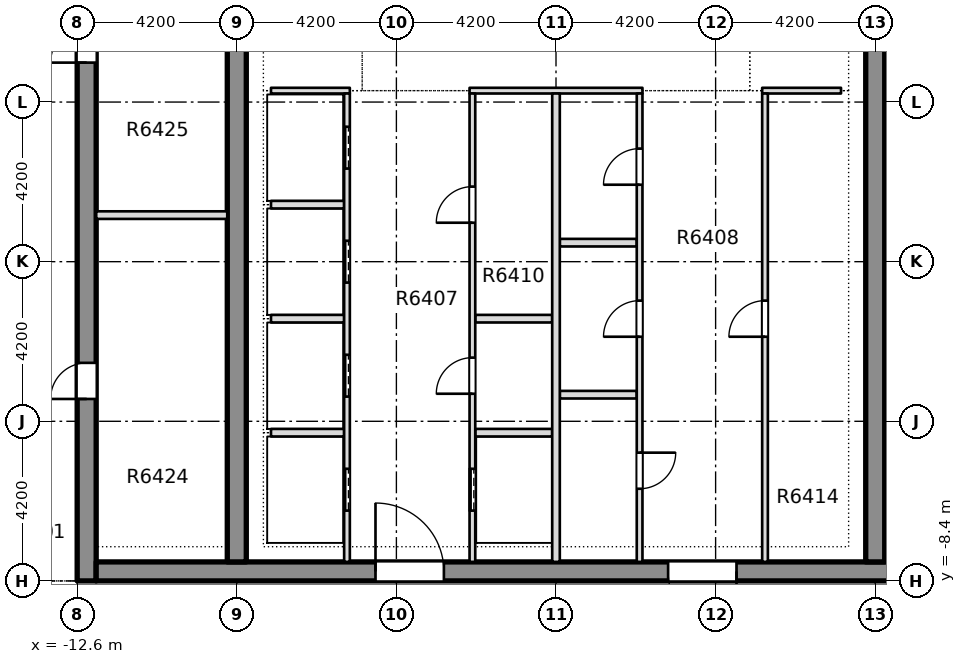
"""IFC4 building model, lengths in metres.
Left out: names, types, materials, properties, quantities, classifications, styles, units other than length and angle.
Written with IfcOpenShell. Run it as: python <this file> out.ifc"""

import sys

from ifc_helpers import new_model, si_unit, direction, frame, frame_2d, origin, place, context, subcontext, project, spatial, rectangle, extrude, element, fill, save


model = new_model("IFC4")
c1 = context("Model", 3, precision=1e-05, world=origin(), true_north=direction((0.0, 1.0)))
c2 = subcontext(c1, "Body", "Model", "MODEL_VIEW")
j1 = project(units=[si_unit("LENGTHUNIT", "METRE"), si_unit("PLANEANGLEUNIT", "RADIAN")], contexts=[c1])
p1 = place(None, origin())
s1 = spatial("IfcSite", under=j1, at=p1, CompositionType="ELEMENT")
p2 = place(p1, origin())
s2 = spatial("IfcBuilding", under=s1, at=p2, CompositionType="ELEMENT")
p3 = place(p2, frame((0.0, 0.0, 244.15)))
s3 = spatial("IfcBuildingStorey", under=s2, at=p3, CompositionType="ELEMENT", Elevation=244.15)
p4 = place(p3, frame((-12.35, -8.4, -0.4), z_axis=(0.0, 0.0, 1.0), x_axis=(0.0, 1.0, 0.0)))
e1 = element("IfcWall", 1, at=p4, inside=s3, PredefinedType="SHEAR", context=c2, shape_type="SweptSolid", body=[
    extrude(rectangle(XDim=30.15, YDim=0.5, at=frame_2d((15.075, 0.0))), origin(), (0.0, 0.0, 1.0), 3.45),
])
p5 = place(p4, frame((4.788, 0.0, 0.4)))
e2 = element("IfcOpeningElement", 2, at=p5, cuts=e1, PredefinedType="OPENING", context=c2, shape_type="SweptSolid", body=[
    extrude(rectangle(XDim=0.95, YDim=2.1, at=frame_2d((0.475, 1.05))), frame((0.0, 0.26, 0.0), z_axis=(0.0, -1.0, 0.0), x_axis=(1.0, 0.0, 0.0)), (0.0, 0.0, 1.0), 0.52),
])
p6 = place(p4, frame((13.638, 0.0, 0.4)))
e3 = element("IfcOpeningElement", 3, at=p6, cuts=e1, PredefinedType="OPENING", context=c2, shape_type="SweptSolid", body=[
    extrude(rectangle(XDim=0.95, YDim=2.1, at=frame_2d((0.475, 1.05))), frame((0.0, 0.26, 0.0), z_axis=(0.0, -1.0, 0.0), x_axis=(1.0, 0.0, 0.0)), (0.0, 0.0, 1.0), 0.52),
])
p7 = place(p4, frame((21.771, 0.0, 0.4)))
e4 = element("IfcOpeningElement", 4, at=p7, cuts=e1, PredefinedType="OPENING", context=c2, shape_type="SweptSolid", body=[
    extrude(rectangle(XDim=0.95, YDim=2.1, at=frame_2d((0.475, 1.05))), frame((0.0, 0.26, 0.0), z_axis=(0.0, -1.0, 0.0), x_axis=(1.0, 0.0, 0.0)), (0.0, 0.0, 1.0), 0.52),
])
p8 = place(p4, frame((24.576, 0.0, 0.4)))
e5 = element("IfcOpeningElement", 5, at=p8, cuts=e1, PredefinedType="OPENING", context=c2, shape_type="SweptSolid", body=[
    extrude(rectangle(XDim=0.95, YDim=2.1, at=frame_2d((0.475, 1.05))), frame((0.0, 0.26, 0.0), z_axis=(0.0, -1.0, 0.0), x_axis=(1.0, 0.0, 0.0)), (0.0, 0.0, 1.0), 0.52),
])
p9 = place(p4, frame((27.555, 0.0, 0.4)))
e6 = element("IfcOpeningElement", 6, at=p9, cuts=e1, PredefinedType="OPENING", context=c2, shape_type="SweptSolid", body=[
    extrude(rectangle(XDim=0.95, YDim=2.1, at=frame_2d((0.475, 1.05))), frame((0.0, 0.26, 0.0), z_axis=(0.0, -1.0, 0.0), x_axis=(1.0, 0.0, 0.0)), (0.0, 0.0, 1.0), 0.52),
])
p10 = place(p4, frame((19.3, 0.0, 0.4)))
e7 = element("IfcOpeningElement", 7, at=p10, cuts=e1, PredefinedType="OPENING", context=c2, shape_type="SweptSolid", body=[
    extrude(rectangle(XDim=1.2, YDim=2.1, at=frame_2d((0.6, 1.05))), frame((0.0, 0.26, 0.0), z_axis=(0.0, -1.0, 0.0), x_axis=(1.0, 0.0, 0.0)), (0.0, 0.0, 1.0), 0.52),
])
p11 = place(p3, frame((-12.1, -8.15, -0.4), z_axis=(0.0, 0.0, 1.0), x_axis=(1.0, 0.0, 0.0)))
e8 = element("IfcWall", 8, at=p11, inside=s3, PredefinedType="SHEAR", context=c2, shape_type="SweptSolid", body=[
    extrude(rectangle(XDim=24.2, YDim=0.5, at=frame_2d((12.1, 0.0))), origin(), (0.0, 0.0, 1.0), 3.45),
])
p12 = place(p11, frame((7.35, 0.0, 0.4)))
e9 = element("IfcOpeningElement", 9, at=p12, cuts=e8, PredefinedType="OPENING", context=c2, shape_type="SweptSolid", body=[
    extrude(rectangle(XDim=1.8, YDim=2.1, at=frame_2d((0.9, 1.05))), frame((0.0, 0.26, 0.0), z_axis=(0.0, -1.0, 0.0), x_axis=(1.0, 0.0, 0.0)), (0.0, 0.0, 1.0), 0.52),
])
p13 = place(p11, frame((15.05, 0.0, 0.4)))
e10 = element("IfcOpeningElement", 10, at=p13, cuts=e8, PredefinedType="OPENING", context=c2, shape_type="SweptSolid", body=[
    extrude(rectangle(XDim=1.8, YDim=2.1, at=frame_2d((0.9, 1.05))), frame((0.0, 0.26, 0.0), z_axis=(0.0, -1.0, 0.0), x_axis=(1.0, 0.0, 0.0)), (0.0, 0.0, 1.0), 0.52),
])
p14 = place(p3, frame((-8.4, -7.9, -0.4), z_axis=(0.0, 0.0, 1.0), x_axis=(0.0, 1.0, 0.0)))
e11 = element("IfcWall", 11, at=p14, inside=s3, PredefinedType="SHEAR", context=c2, shape_type="SweptSolid", body=[
    extrude(rectangle(XDim=29.15, YDim=0.5, at=frame_2d((14.575, 0.0))), origin(), (0.0, 0.0, 1.0), 3.45),
])
p15 = place(p14, frame((18.8, 0.0, 0.4)))
e12 = element("IfcOpeningElement", 12, at=p15, cuts=e11, PredefinedType="OPENING", context=c2, shape_type="SweptSolid", body=[
    extrude(rectangle(XDim=1.2, YDim=2.1, at=frame_2d((0.6, 1.05))), frame((0.0, 0.26, 0.0), z_axis=(0.0, -1.0, 0.0), x_axis=(1.0, 0.0, 0.0)), (0.0, 0.0, 1.0), 0.52),
])
p16 = place(p3, frame((8.4, -7.9, -0.4), z_axis=(0.0, 0.0, 1.0), x_axis=(0.0, 1.0, 0.0)))
e13 = element("IfcWall", 13, at=p16, inside=s3, PredefinedType="SHEAR", context=c2, shape_type="SweptSolid", body=[
    extrude(rectangle(XDim=29.15, YDim=0.5, at=frame_2d((14.575, 0.0))), origin(), (0.0, 0.0, 1.0), 3.45),
])
p17 = place(p16, frame((18.8, 0.0, 0.4)))
e14 = element("IfcOpeningElement", 14, at=p17, cuts=e13, PredefinedType="OPENING", context=c2, shape_type="SweptSolid", body=[
    extrude(rectangle(XDim=1.2, YDim=2.1, at=frame_2d((0.6, 1.05))), frame((0.0, 0.26, 0.0), z_axis=(0.0, -1.0, 0.0), x_axis=(1.0, 0.0, 0.0)), (0.0, 0.0, 1.0), 0.52),
])
p18 = place(p3, frame((-7.5, -4.5, 0.0), z_axis=(0.0, 0.0, 1.0), x_axis=(1.0, 0.0, 0.0)))
e15 = element("IfcWall", 15, at=p18, inside=s3, PredefinedType="PARTITIONING", context=c2, shape_type="SweptSolid", body=[
    extrude(rectangle(XDim=1.925, YDim=0.2, at=frame_2d((0.962, 0.0))), origin(), (0.0, 0.0, 1.0), 3.05),
])
for number, where, z_axis, x_axis in (
    (16, (-2.125, -4.5, 0.0), (0.0, 0.0, 1.0), (1.0, 0.0, 0.0)),
    (17, (0.1, -3.5, 0.0), (0.0, 0.0, 1.0), (1.0, 0.0, 0.0)),
):
    element("IfcWall", number, at=place(p3, frame(where, z_axis=z_axis, x_axis=x_axis)), inside=s3, PredefinedType="PARTITIONING", context=c2, shape_type="SweptSolid", body=[
        extrude(rectangle(XDim=2.025, YDim=0.2, at=frame_2d((1.012, 0.0))), origin(), (0.0, 0.0, 1.0), 3.05),
    ])
p19 = place(p3, frame((-7.5, -1.5, 0.0), z_axis=(0.0, 0.0, 1.0), x_axis=(1.0, 0.0, 0.0)))
e18 = element("IfcWall", 18, at=p19, inside=s3, PredefinedType="PARTITIONING", context=c2, shape_type="SweptSolid", body=[
    extrude(rectangle(XDim=1.925, YDim=0.2, at=frame_2d((0.962, 0.0))), origin(), (0.0, 0.0, 1.0), 3.05),
])
for number, where, z_axis, x_axis in (
    (19, (-2.125, -1.5, 0.0), (0.0, 0.0, 1.0), (1.0, 0.0, 0.0)),
    (20, (0.1, 0.5, 0.0), (0.0, 0.0, 1.0), (1.0, 0.0, 0.0)),
):
    element("IfcWall", number, at=place(p3, frame(where, z_axis=z_axis, x_axis=x_axis)), inside=s3, PredefinedType="PARTITIONING", context=c2, shape_type="SweptSolid", body=[
        extrude(rectangle(XDim=2.025, YDim=0.2, at=frame_2d((1.012, 0.0))), origin(), (0.0, 0.0, 1.0), 3.05),
    ])
p20 = place(p3, frame((-7.5, 1.5, 0.0), z_axis=(0.0, 0.0, 1.0), x_axis=(1.0, 0.0, 0.0)))
e21 = element("IfcWall", 21, at=p20, inside=s3, PredefinedType="PARTITIONING", context=c2, shape_type="SweptSolid", body=[
    extrude(rectangle(XDim=1.925, YDim=0.2, at=frame_2d((0.962, 0.0))), origin(), (0.0, 0.0, 1.0), 3.05),
])
p21 = place(p3, frame((-7.5, 4.5, 0.0), z_axis=(0.0, 0.0, 1.0), x_axis=(1.0, 0.0, 0.0)))
e22 = element("IfcWall", 22, at=p21, inside=s3, PredefinedType="PARTITIONING", context=c2, shape_type="SweptSolid", body=[
    extrude(rectangle(XDim=2.075, YDim=0.15, at=frame_2d((1.038, 0.0))), origin(), (0.0, 0.0, 1.0), 3.05),
])
p22 = place(p3, frame((-2.275, 4.5, 0.0), z_axis=(0.0, 0.0, 1.0), x_axis=(1.0, 0.0, 0.0)))
e23 = element("IfcWall", 23, at=p22, inside=s3, PredefinedType="PARTITIONING", context=c2, shape_type="SweptSolid", body=[
    extrude(rectangle(XDim=4.55, YDim=0.15, at=frame_2d((2.275, 0.0))), origin(), (0.0, 0.0, 1.0), 3.05),
])
p23 = place(p3, frame((5.425, 4.5, 0.0), z_axis=(0.0, 0.0, 1.0), x_axis=(1.0, 0.0, 0.0)))
e24 = element("IfcWall", 24, at=p23, inside=s3, PredefinedType="PARTITIONING", context=c2, shape_type="SweptSolid", body=[
    extrude(rectangle(XDim=2.075, YDim=0.15, at=frame_2d((1.038, 0.0))), origin(), (0.0, 0.0, 1.0), 3.05),
])
p24 = place(p3, frame((-5.5, -7.899, 0.0), z_axis=(0.0, 0.0, 1.0), x_axis=(0.0, 1.0, 0.0)))
e25 = element("IfcWall", 25, at=p24, inside=s3, PredefinedType="PARTITIONING", context=c2, shape_type="SweptSolid", body=[
    extrude(rectangle(XDim=12.324, YDim=0.15, at=frame_2d((6.162, 0.0))), origin(), (0.0, 0.0, 1.0), 3.05),
])
p25 = place(p24, frame((1.349, 0.0, 0.0)))
e26 = element("IfcOpeningElement", 26, at=p25, cuts=e25, PredefinedType="OPENING", context=c2, shape_type="SweptSolid", body=[
    extrude(rectangle(XDim=1.1, YDim=2.1, at=frame_2d((0.55, 1.05))), frame((0.0, 0.085, 0.0), z_axis=(0.0, -1.0, 0.0), x_axis=(1.0, 0.0, 0.0)), (0.0, 0.0, 1.0), 0.17),
])
p26 = place(p24, frame((4.349, 0.0, 0.0)))
e27 = element("IfcOpeningElement", 27, at=p26, cuts=e25, PredefinedType="OPENING", context=c2, shape_type="SweptSolid", body=[
    extrude(rectangle(XDim=1.1, YDim=2.1, at=frame_2d((0.55, 1.05))), frame((0.0, 0.085, 0.0), z_axis=(0.0, -1.0, 0.0), x_axis=(1.0, 0.0, 0.0)), (0.0, 0.0, 1.0), 0.17),
])
p27 = place(p24, frame((7.349, 0.0, 0.0)))
e28 = element("IfcOpeningElement", 28, at=p27, cuts=e25, PredefinedType="OPENING", context=c2, shape_type="SweptSolid", body=[
    extrude(rectangle(XDim=1.1, YDim=2.1, at=frame_2d((0.55, 1.05))), frame((0.0, 0.085, 0.0), z_axis=(0.0, -1.0, 0.0), x_axis=(1.0, 0.0, 0.0)), (0.0, 0.0, 1.0), 0.17),
])
p28 = place(p24, frame((10.349, 0.0, 0.0)))
e29 = element("IfcOpeningElement", 29, at=p28, cuts=e25, PredefinedType="OPENING", context=c2, shape_type="SweptSolid", body=[
    extrude(rectangle(XDim=1.1, YDim=2.1, at=frame_2d((0.55, 1.05))), frame((0.0, 0.085, 0.0), z_axis=(0.0, -1.0, 0.0), x_axis=(1.0, 0.0, 0.0)), (0.0, 0.0, 1.0), 0.17),
])
p29 = place(p3, frame((-2.2, -7.899, 0.0), z_axis=(0.0, 0.0, 1.0), x_axis=(0.0, 1.0, 0.0)))
e30 = element("IfcWall", 30, at=p29, inside=s3, PredefinedType="PARTITIONING", context=c2, shape_type="SweptSolid", body=[
    extrude(rectangle(XDim=12.324, YDim=0.15, at=frame_2d((6.162, 0.0))), origin(), (0.0, 0.0, 1.0), 3.05),
])
p30 = place(p29, frame((1.349, 0.0, 0.0)))
e31 = element("IfcOpeningElement", 31, at=p30, cuts=e30, PredefinedType="OPENING", context=c2, shape_type="SweptSolid", body=[
    extrude(rectangle(XDim=1.1, YDim=2.1, at=frame_2d((0.55, 1.05))), frame((0.0, 0.085, 0.0), z_axis=(0.0, -1.0, 0.0), x_axis=(1.0, 0.0, 0.0)), (0.0, 0.0, 1.0), 0.17),
])
p31 = place(p29, frame((4.424, 0.0, 0.0)))
e32 = element("IfcOpeningElement", 32, at=p31, cuts=e30, PredefinedType="OPENING", context=c2, shape_type="SweptSolid", body=[
    extrude(rectangle(XDim=0.95, YDim=2.1, at=frame_2d((0.475, 1.05))), frame((0.0, 0.085, 0.0), z_axis=(0.0, -1.0, 0.0), x_axis=(1.0, 0.0, 0.0)), (0.0, 0.0, 1.0), 0.17),
])
p32 = place(p29, frame((8.924, 0.0, 0.0)))
e33 = element("IfcOpeningElement", 33, at=p32, cuts=e30, PredefinedType="OPENING", context=c2, shape_type="SweptSolid", body=[
    extrude(rectangle(XDim=0.95, YDim=2.1, at=frame_2d((0.475, 1.05))), frame((0.0, 0.085, 0.0), z_axis=(0.0, -1.0, 0.0), x_axis=(1.0, 0.0, 0.0)), (0.0, 0.0, 1.0), 0.17),
])
p33 = place(p3, frame((0.0, -7.899, 0.0), z_axis=(0.0, 0.0, 1.0), x_axis=(0.0, 1.0, 0.0)))
e34 = element("IfcWall", 34, at=p33, inside=s3, PredefinedType="PARTITIONING", context=c2, shape_type="SweptSolid", body=[
    extrude(rectangle(XDim=12.324, YDim=0.2, at=frame_2d((6.162, 0.0))), origin(), (0.0, 0.0, 1.0), 3.05),
])
p34 = place(p3, frame((2.2, -7.899, 0.0), z_axis=(0.0, 0.0, 1.0), x_axis=(0.0, 1.0, 0.0)))
e35 = element("IfcWall", 35, at=p34, inside=s3, PredefinedType="PARTITIONING", context=c2, shape_type="SweptSolid", body=[
    extrude(rectangle(XDim=12.324, YDim=0.15, at=frame_2d((6.162, 0.0))), origin(), (0.0, 0.0, 1.0), 3.05),
])
p35 = place(p34, frame((1.924, 0.0, 0.0)))
e36 = element("IfcOpeningElement", 36, at=p35, cuts=e35, PredefinedType="OPENING", context=c2, shape_type="SweptSolid", body=[
    extrude(rectangle(XDim=0.95, YDim=2.1, at=frame_2d((0.475, 1.05))), frame((0.0, 0.085, 0.0), z_axis=(0.0, -1.0, 0.0), x_axis=(1.0, 0.0, 0.0)), (0.0, 0.0, 1.0), 0.17),
])
p36 = place(p34, frame((5.924, 0.0, 0.0)))
e37 = element("IfcOpeningElement", 37, at=p36, cuts=e35, PredefinedType="OPENING", context=c2, shape_type="SweptSolid", body=[
    extrude(rectangle(XDim=0.95, YDim=2.1, at=frame_2d((0.475, 1.05))), frame((0.0, 0.085, 0.0), z_axis=(0.0, -1.0, 0.0), x_axis=(1.0, 0.0, 0.0)), (0.0, 0.0, 1.0), 0.17),
])
p37 = place(p34, frame((9.924, 0.0, 0.0)))
e38 = element("IfcOpeningElement", 38, at=p37, cuts=e35, PredefinedType="OPENING", context=c2, shape_type="SweptSolid", body=[
    extrude(rectangle(XDim=0.95, YDim=2.1, at=frame_2d((0.475, 1.05))), frame((0.0, 0.085, 0.0), z_axis=(0.0, -1.0, 0.0), x_axis=(1.0, 0.0, 0.0)), (0.0, 0.0, 1.0), 0.17),
])
p38 = place(p3, frame((5.5, -7.899, 0.0), z_axis=(0.0, 0.0, 1.0), x_axis=(0.0, 1.0, 0.0)))
e39 = element("IfcWall", 39, at=p38, inside=s3, PredefinedType="PARTITIONING", context=c2, shape_type="SweptSolid", body=[
    extrude(rectangle(XDim=12.324, YDim=0.15, at=frame_2d((6.162, 0.0))), origin(), (0.0, 0.0, 1.0), 3.05),
])
p39 = place(p38, frame((5.924, 0.0, 0.0)))
e40 = element("IfcOpeningElement", 40, at=p39, cuts=e39, PredefinedType="OPENING", context=c2, shape_type="SweptSolid", body=[
    extrude(rectangle(XDim=0.95, YDim=2.1, at=frame_2d((0.475, 1.05))), frame((0.0, 0.085, 0.0), z_axis=(0.0, -1.0, 0.0), x_axis=(1.0, 0.0, 0.0)), (0.0, 0.0, 1.0), 0.17),
])
for number, where, z_axis, x_axis in (
    (41, (-12.099, 1.225, 0.0), (0.0, 0.0, 1.0), (1.0, 0.0, 0.0)),
    (42, (8.651, -1.519, 0.0), (0.0, 0.0, 1.0), (1.0, 0.0, 0.0)),
    (43, (8.651, 1.533, 0.0), (0.0, 0.0, 1.0), (1.0, 0.0, 0.0)),
):
    element("IfcWall", number, at=place(p3, frame(where, z_axis=z_axis, x_axis=x_axis)), inside=s3, PredefinedType="PARTITIONING", context=c2, shape_type="SweptSolid", body=[
        extrude(rectangle(XDim=3.448, YDim=0.2, at=frame_2d((1.724, 0.0))), origin(), (0.0, 0.0, 1.0), 3.05),
    ])
p40 = place(p25, origin())
e44 = element("IfcDoor", 44, at=p40, inside=s3, OperationType="SLIDING_TO_LEFT", PredefinedType="DOOR", context=c2, shape_type="SweptSolid", body=[
    extrude(rectangle(XDim=1.1, YDim=2.1, at=frame_2d((0.55, 1.05))), frame((0.0, 0.025, 0.0), z_axis=(0.0, -1.0, 0.0), x_axis=(1.0, 0.0, 0.0)), (0.0, 0.0, 1.0), 0.05),
])
fill(e26, e44)
p41 = place(p26, origin())
e45 = element("IfcDoor", 45, at=p41, inside=s3, OperationType="SLIDING_TO_LEFT", PredefinedType="DOOR", context=c2, shape_type="SweptSolid", body=[
    extrude(rectangle(XDim=1.1, YDim=2.1, at=frame_2d((0.55, 1.05))), frame((0.0, 0.025, 0.0), z_axis=(0.0, -1.0, 0.0), x_axis=(1.0, 0.0, 0.0)), (0.0, 0.0, 1.0), 0.05),
])
fill(e27, e45)
p42 = place(p27, origin())
e46 = element("IfcDoor", 46, at=p42, inside=s3, OperationType="SLIDING_TO_LEFT", PredefinedType="DOOR", context=c2, shape_type="SweptSolid", body=[
    extrude(rectangle(XDim=1.1, YDim=2.1, at=frame_2d((0.55, 1.05))), frame((0.0, 0.025, 0.0), z_axis=(0.0, -1.0, 0.0), x_axis=(1.0, 0.0, 0.0)), (0.0, 0.0, 1.0), 0.05),
])
fill(e28, e46)
p43 = place(p28, origin())
e47 = element("IfcDoor", 47, at=p43, inside=s3, OperationType="SLIDING_TO_LEFT", PredefinedType="DOOR", context=c2, shape_type="SweptSolid", body=[
    extrude(rectangle(XDim=1.1, YDim=2.1, at=frame_2d((0.55, 1.05))), frame((0.0, 0.025, 0.0), z_axis=(0.0, -1.0, 0.0), x_axis=(1.0, 0.0, 0.0)), (0.0, 0.0, 1.0), 0.05),
])
fill(e29, e47)
p44 = place(p30, origin())
e48 = element("IfcDoor", 48, at=p44, inside=s3, OperationType="SLIDING_TO_LEFT", PredefinedType="DOOR", context=c2, shape_type="SweptSolid", body=[
    extrude(rectangle(XDim=1.1, YDim=2.1, at=frame_2d((0.55, 1.05))), frame((0.0, 0.025, 0.0), z_axis=(0.0, -1.0, 0.0), x_axis=(1.0, 0.0, 0.0)), (0.0, 0.0, 1.0), 0.05),
])
fill(e31, e48)
p45 = place(p31, origin())
e49 = element("IfcDoor", 49, at=p45, inside=s3, OperationType="SINGLE_SWING_RIGHT", PredefinedType="DOOR", context=c2, shape_type="SweptSolid", body=[
    extrude(rectangle(XDim=0.95, YDim=2.1, at=frame_2d((0.475, 1.05))), frame((0.0, 0.025, 0.0), z_axis=(0.0, -1.0, 0.0), x_axis=(1.0, 0.0, 0.0)), (0.0, 0.0, 1.0), 0.05),
])
fill(e32, e49)
p46 = place(p32, origin())
e50 = element("IfcDoor", 50, at=p46, inside=s3, OperationType="SINGLE_SWING_LEFT", PredefinedType="DOOR", context=c2, shape_type="SweptSolid", body=[
    extrude(rectangle(XDim=0.95, YDim=2.1, at=frame_2d((0.475, 1.05))), frame((0.0, 0.025, 0.0), z_axis=(0.0, -1.0, 0.0), x_axis=(1.0, 0.0, 0.0)), (0.0, 0.0, 1.0), 0.05),
])
fill(e33, e50)
p47 = place(p35, origin())
e51 = element("IfcDoor", 51, at=p47, inside=s3, OperationType="SINGLE_SWING_RIGHT", PredefinedType="DOOR", context=c2, shape_type="SweptSolid", body=[
    extrude(rectangle(XDim=0.95, YDim=2.1, at=frame_2d((0.475, 1.05))), frame((0.0, 0.025, 0.0), z_axis=(0.0, -1.0, 0.0), x_axis=(1.0, 0.0, 0.0)), (0.0, 0.0, 1.0), 0.05),
])
fill(e36, e51)
p48 = place(p36, origin())
e52 = element("IfcDoor", 52, at=p48, inside=s3, OperationType="SINGLE_SWING_RIGHT", PredefinedType="DOOR", context=c2, shape_type="SweptSolid", body=[
    extrude(rectangle(XDim=0.95, YDim=2.1, at=frame_2d((0.475, 1.05))), frame((0.0, 0.025, 0.0), z_axis=(0.0, -1.0, 0.0), x_axis=(1.0, 0.0, 0.0)), (0.0, 0.0, 1.0), 0.05),
])
fill(e37, e52)
p49 = place(p37, origin())
e53 = element("IfcDoor", 53, at=p49, inside=s3, OperationType="SINGLE_SWING_LEFT", PredefinedType="DOOR", context=c2, shape_type="SweptSolid", body=[
    extrude(rectangle(XDim=0.95, YDim=2.1, at=frame_2d((0.475, 1.05))), frame((0.0, 0.025, 0.0), z_axis=(0.0, -1.0, 0.0), x_axis=(1.0, 0.0, 0.0)), (0.0, 0.0, 1.0), 0.05),
])
fill(e38, e53)
p50 = place(p39, origin())
e54 = element("IfcDoor", 54, at=p50, inside=s3, OperationType="SINGLE_SWING_LEFT", PredefinedType="DOOR", context=c2, shape_type="SweptSolid", body=[
    extrude(rectangle(XDim=0.95, YDim=2.1, at=frame_2d((0.475, 1.05))), frame((0.0, 0.025, 0.0), z_axis=(0.0, -1.0, 0.0), x_axis=(1.0, 0.0, 0.0)), (0.0, 0.0, 1.0), 0.05),
])
fill(e40, e54)
p51 = place(p12, origin())
e55 = element("IfcDoor", 55, at=p51, inside=s3, OperationType="SINGLE_SWING_LEFT", PredefinedType="DOOR", context=c2, shape_type="SweptSolid", body=[
    extrude(rectangle(XDim=1.8, YDim=2.1, at=frame_2d((0.9, 1.05))), frame((0.0, 0.025, 0.0), z_axis=(0.0, -1.0, 0.0), x_axis=(1.0, 0.0, 0.0)), (0.0, 0.0, 1.0), 0.05),
])
fill(e9, e55)
p52 = place(p13, origin())
e56 = element("IfcDoor", 56, at=p52, inside=s3, OperationType="SINGLE_SWING_LEFT", PredefinedType="DOOR", context=c2, shape_type="SweptSolid", body=[
    extrude(rectangle(XDim=1.8, YDim=2.1, at=frame_2d((0.9, 1.05))), frame((0.0, 0.025, 0.0), z_axis=(0.0, -1.0, 0.0), x_axis=(1.0, 0.0, 0.0)), (0.0, 0.0, 1.0), 0.05),
])
fill(e10, e56)
p53 = place(p5, origin())
e57 = element("IfcDoor", 57, at=p53, inside=s3, OperationType="SINGLE_SWING_LEFT", PredefinedType="DOOR", context=c2, shape_type="SweptSolid", body=[
    extrude(rectangle(XDim=0.95, YDim=2.1, at=frame_2d((0.475, 1.05))), frame((0.0, 0.025, 0.0), z_axis=(0.0, -1.0, 0.0), x_axis=(1.0, 0.0, 0.0)), (0.0, 0.0, 1.0), 0.05),
])
fill(e2, e57)
p54 = place(p6, origin())
e58 = element("IfcDoor", 58, at=p54, inside=s3, OperationType="SINGLE_SWING_LEFT", PredefinedType="DOOR", context=c2, shape_type="SweptSolid", body=[
    extrude(rectangle(XDim=0.95, YDim=2.1, at=frame_2d((0.475, 1.05))), frame((0.0, 0.025, 0.0), z_axis=(0.0, -1.0, 0.0), x_axis=(1.0, 0.0, 0.0)), (0.0, 0.0, 1.0), 0.05),
])
fill(e3, e58)
save(model, sys.argv[1])
